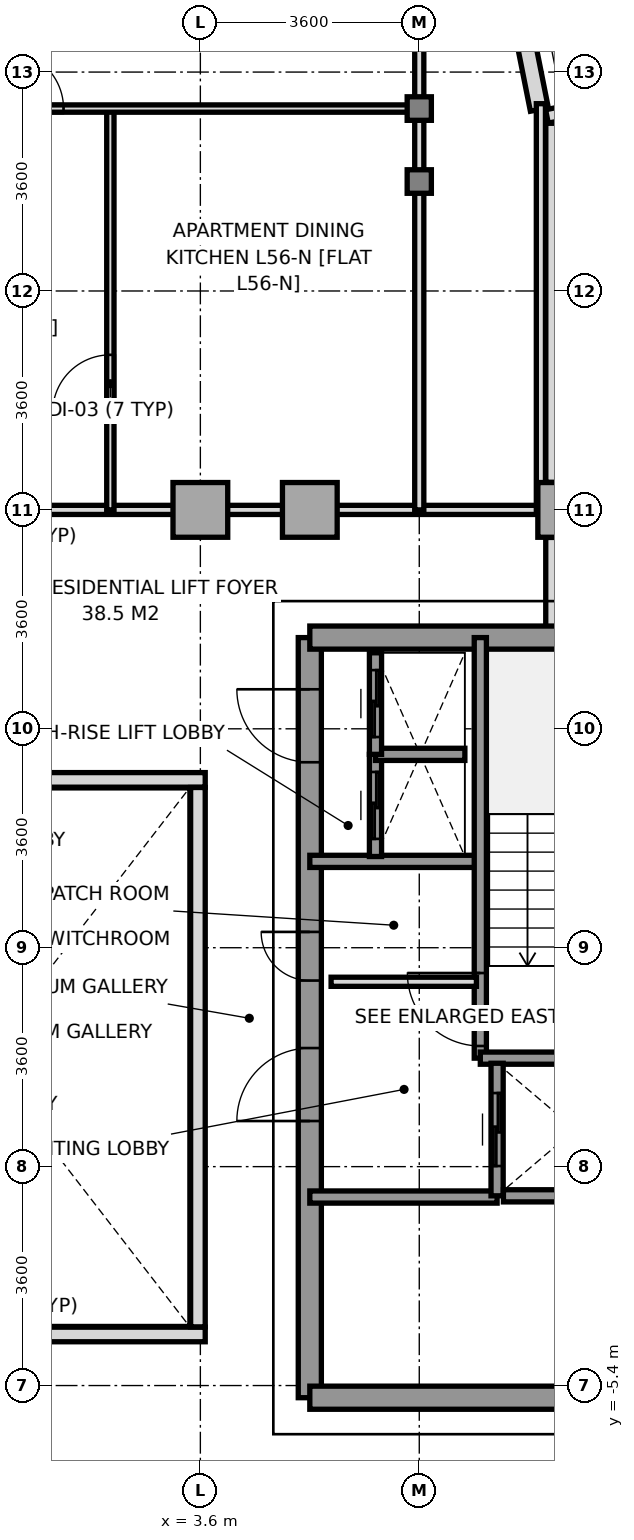
"""IFC4 building model, lengths in metres.
Left out: names, types, materials, properties, quantities, classifications, styles, units other than length and angle.
Written with IfcOpenShell. Run it as: python <this file> out.ifc"""

import sys

from ifc_helpers import new_model, si_unit, direction, frame, frame_2d, origin, origin_2d, place, context, subcontext, project, spatial, rectangle, i_section, extrude, source, transform, mapped, element, fill, save


model = new_model("IFC4")
c1 = context("Model", 3, precision=1e-05, world=origin(), true_north=direction((0.0, 1.0)))
c2 = subcontext(c1, "Body", "Model", "MODEL_VIEW")
j1 = project(units=[si_unit("LENGTHUNIT", "METRE"), si_unit("PLANEANGLEUNIT", "RADIAN")], contexts=[c1])
p1 = place(None, origin())
s1 = spatial("IfcSite", under=j1, at=p1, CompositionType="ELEMENT")
p2 = place(p1, origin())
s2 = spatial("IfcBuilding", under=s1, at=p2, CompositionType="ELEMENT")
p3 = place(p2, frame((0.0, 0.0, 204.6)))
s3 = spatial("IfcBuildingStorey", under=s2, at=p3, CompositionType="ELEMENT", Elevation=204.6)
m1 = source(origin(), c2, "Body", "SweptSolid", [
    extrude(rectangle(XDim=0.9, YDim=0.9, at=origin_2d()), origin(), (0.0, 0.0, 1.0), 3.2),
])
for number, where, z_axis, x_axis in (
    (1, (3.6, 9.0, 0.0), (0.0, 0.0, 1.0), (1.0, 0.0, 0.0)),
    (2, (5.4, 9.0, 0.0), (0.0, 0.0, 1.0), (1.0, 0.0, 0.0)),
):
    element("IfcColumn", number, at=place(p3, frame(where, z_axis=z_axis, x_axis=x_axis)), inside=s3, PredefinedType="COLUMN", context=c2, shape_type="MappedRepresentation", body=[
        mapped(m1, transform((0.0, 0.0, 0.0), x_axis=(1.0, 0.0, 0.0), y_axis=(0.0, 1.0, 0.0), z_axis=(0.0, 0.0, 1.0), scale=1.0)),
    ])
m2 = source(origin(), c2, "Body", "SweptSolid", [
    extrude(i_section(OverallWidth=0.398, OverallDepth=0.387, WebThickness=0.018, FlangeThickness=0.028, at=origin_2d()), origin(), (0.0, 0.0, 1.0), 3.2),
])
for number, where, z_axis, x_axis in (
    (3, (7.2, 14.4, 0.0), (0.0, 0.0, 1.0), (1.0, 0.0, 0.0)),
    (4, (7.2, 15.6, 0.0), (0.0, 0.0, 1.0), (1.0, 0.0, 0.0)),
):
    element("IfcColumn", number, at=place(p3, frame(where, z_axis=z_axis, x_axis=x_axis)), inside=s3, PredefinedType="COLUMN", context=c2, shape_type="MappedRepresentation", body=[
        mapped(m2, transform((0.0, 0.0, 0.0), x_axis=(1.0, 0.0, 0.0), y_axis=(0.0, 1.0, 0.0), z_axis=(0.0, 0.0, 1.0), scale=1.0)),
    ])
p4 = place(p3, frame((9.6, 9.0, 0.0), z_axis=(0.0, 0.0, 1.0), x_axis=(1.0, 0.0, 0.0)))
e5 = element("IfcColumn", 5, at=p4, inside=s3, PredefinedType="COLUMN", context=c2, shape_type="MappedRepresentation", body=[
    mapped(m1, transform((0.0, 0.0, 0.0), x_axis=(1.0, 0.0, 0.0), y_axis=(0.0, 1.0, 0.0), z_axis=(0.0, 0.0, 1.0), scale=1.0)),
])
p5 = place(p3, frame((9.175, 15.585, 0.0), z_axis=(0.0, 0.0, 1.0), x_axis=(-0.195114232679, 0.980780523974, 0.0)))
e6 = element("IfcWall", 6, at=p5, inside=s3, PredefinedType="SOLIDWALL", context=c2, shape_type="SweptSolid", body=[
    extrude(rectangle(XDim=3.609, YDim=0.3, at=frame_2d((1.804, 0.0))), origin(), (0.0, 0.0, 1.0), 3.2),
])
p6 = place(p3, frame((9.395, 15.604, 0.0), z_axis=(0.0, 0.0, 1.0), x_axis=(0.194652052864, -0.980872355771, 0.0)))
e7 = element("IfcWall", 7, at=p6, inside=s3, PredefinedType="PARAPET", context=c2, shape_type="SweptSolid", body=[
    extrude(rectangle(XDim=0.225, YDim=0.24, at=frame_2d((0.112, 0.0))), origin(), (0.0, 0.0, 1.0), 1.15),
])
p7 = place(p3, frame((9.4, 15.358, 0.0), z_axis=(0.0, 0.0, 1.0), x_axis=(0.0, -1.0, 0.0)))
e8 = element("IfcWall", 8, at=p7, inside=s3, PredefinedType="PARAPET", context=c2, shape_type="SweptSolid", body=[
    extrude(rectangle(XDim=5.905, YDim=0.24, at=frame_2d((2.952, 0.0))), origin(), (0.0, 0.0, 1.0), 1.15),
])
p8 = place(p3, frame((9.4, 8.547, 0.0), z_axis=(0.0, 0.0, 1.0), x_axis=(0.0, -1.0, 0.0)))
e9 = element("IfcWall", 9, at=p8, inside=s3, PredefinedType="PARAPET", context=c2, shape_type="SweptSolid", body=[
    extrude(rectangle(XDim=1.594, YDim=0.24, at=frame_2d((0.797, 0.0))), origin(), (0.0, 0.0, 1.0), 1.15),
])
p9 = place(p3, frame((5.4, -5.6, 0.0), z_axis=(0.0, 0.0, 1.0), x_axis=(0.0, 1.0, 0.0)))
e10 = element("IfcWall", 10, at=p9, inside=s3, PredefinedType="SHEAR", context=c2, shape_type="SweptSolid", body=[
    extrude(rectangle(XDim=12.5, YDim=0.38, at=frame_2d((6.25, 0.0))), origin(), (0.0, 0.0, 1.0), 3.2),
])
p10 = place(p9, frame((4.55, 0.0, 0.0)))
e11 = element("IfcOpeningElement", 11, at=p10, cuts=e10, PredefinedType="OPENING", context=c2, shape_type="SweptSolid", body=[
    extrude(rectangle(XDim=1.2, YDim=2.2, at=frame_2d((0.6, 1.1))), frame((0.0, 0.2, 0.0), z_axis=(0.0, -1.0, 0.0), x_axis=(1.0, 0.0, 0.0)), (0.0, 0.0, 1.0), 0.4),
])
p11 = place(p9, frame((10.45, 0.0, 0.0)))
e12 = element("IfcOpeningElement", 12, at=p11, cuts=e10, PredefinedType="OPENING", context=c2, shape_type="SweptSolid", body=[
    extrude(rectangle(XDim=1.2, YDim=2.2, at=frame_2d((0.6, 1.1))), frame((0.0, 0.2, 0.0), z_axis=(0.0, -1.0, 0.0), x_axis=(1.0, 0.0, 0.0)), (0.0, 0.0, 1.0), 0.4),
])
p12 = place(p9, frame((6.86, 0.0, 0.0)))
e13 = element("IfcOpeningElement", 13, at=p12, cuts=e10, PredefinedType="OPENING", context=c2, shape_type="SweptSolid", body=[
    extrude(rectangle(XDim=0.8, YDim=2.1, at=frame_2d((0.4, 1.05))), frame((0.0, 0.2, 0.0), z_axis=(0.0, -1.0, 0.0), x_axis=(1.0, 0.0, 0.0)), (0.0, 0.0, 1.0), 0.4),
])
p13 = place(p3, frame((5.4, 6.9, 0.0), z_axis=(0.0, 0.0, 1.0), x_axis=(1.0, 0.0, 0.0)))
e14 = element("IfcWall", 14, at=p13, inside=s3, PredefinedType="SHEAR", context=c2, shape_type="SweptSolid", body=[
    extrude(rectangle(XDim=5.956, YDim=0.38, at=frame_2d((2.978, 0.0))), origin(), (0.0, 0.0, 1.0), 3.2),
])
p14 = place(p3, frame((5.4, -5.6, 0.0), z_axis=(0.0, 0.0, 1.0), x_axis=(1.0, 0.0, 0.0)))
e15 = element("IfcWall", 15, at=p14, inside=s3, PredefinedType="SHEAR", context=c2, shape_type="SweptSolid", body=[
    extrude(rectangle(XDim=7.8, YDim=0.38, at=frame_2d((3.9, 0.0))), origin(), (0.0, 0.0, 1.0), 3.2),
])
p15 = place(p3, frame((5.4, 3.22, 0.0), z_axis=(0.0, 0.0, 1.0), x_axis=(1.0, 0.0, 0.0)))
e16 = element("IfcWall", 16, at=p15, inside=s3, PredefinedType="SOLIDWALL", context=c2, shape_type="SweptSolid", body=[
    extrude(rectangle(XDim=2.78, YDim=0.2, at=frame_2d((1.39, 0.0))), origin(), (0.0, 0.0, 1.0), 3.2),
])
p16 = place(p3, frame((5.4, -2.3, 0.0), z_axis=(0.0, 0.0, 1.0), x_axis=(1.0, 0.0, 0.0)))
e17 = element("IfcWall", 17, at=p16, inside=s3, PredefinedType="SOLIDWALL", context=c2, shape_type="SweptSolid", body=[
    extrude(rectangle(XDim=3.08, YDim=0.2, at=frame_2d((1.54, 0.0))), origin(), (0.0, 0.0, 1.0), 3.2),
])
p17 = place(p3, frame((8.204, -0.016, 0.0), z_axis=(0.0, 0.0, 1.0), x_axis=(0.0, 1.0, 0.0)))
e18 = element("IfcWall", 18, at=p17, inside=s3, PredefinedType="SOLIDWALL", context=c2, shape_type="SweptSolid", body=[
    extrude(rectangle(XDim=6.916, YDim=0.2, at=frame_2d((3.458, 0.0))), origin(), (0.0, 0.0, 1.0), 3.2),
])
p18 = place(p17, frame((0.2, 0.0, 0.0)))
e19 = element("IfcOpeningElement", 19, at=p18, cuts=e18, PredefinedType="OPENING", context=c2, shape_type="SweptSolid", body=[
    extrude(rectangle(XDim=1.2, YDim=2.2, at=frame_2d((0.6, 1.1))), frame((0.0, 0.11, 0.0), z_axis=(0.0, -1.0, 0.0), x_axis=(1.0, 0.0, 0.0)), (0.0, 0.0, 1.0), 0.22),
])
p19 = place(p3, frame((8.204, -0.016, 0.0), z_axis=(0.0, 0.0, 1.0), x_axis=(1.0, 0.0, 0.0)))
e20 = element("IfcWall", 20, at=p19, inside=s3, PredefinedType="SOLIDWALL", context=c2, shape_type="SweptSolid", body=[
    extrude(rectangle(XDim=3.152, YDim=0.2, at=frame_2d((1.576, 0.0))), origin(), (0.0, 0.0, 1.0), 3.2),
])
p20 = place(p3, frame((8.48, -2.28, 0.0), z_axis=(0.0, 0.0, 1.0), x_axis=(0.0, 1.0, 0.0)))
e21 = element("IfcWall", 21, at=p20, inside=s3, PredefinedType="SOLIDWALL", context=c2, shape_type="SweptSolid", body=[
    extrude(rectangle(XDim=2.18, YDim=0.2, at=frame_2d((1.09, 0.0))), origin(), (0.0, 0.0, 1.0), 3.2),
])
p21 = place(p20, frame((0.49, 0.0, 0.0)))
e22 = element("IfcOpeningElement", 22, at=p21, cuts=e21, PredefinedType="OPENING", context=c2, shape_type="SweptSolid", body=[
    extrude(rectangle(XDim=1.2, YDim=2.2, at=frame_2d((0.6, 1.1))), frame((0.0, 0.11, 0.0), z_axis=(0.0, -1.0, 0.0), x_axis=(1.0, 0.0, 0.0)), (0.0, 0.0, 1.0), 0.22),
])
p22 = place(p3, frame((8.584, -2.28, 0.0), z_axis=(0.0, 0.0, 1.0), x_axis=(1.0, 0.0, 0.0)))
e23 = element("IfcWall", 23, at=p22, inside=s3, PredefinedType="SOLIDWALL", context=c2, shape_type="SweptSolid", body=[
    extrude(rectangle(XDim=2.362, YDim=0.2, at=frame_2d((1.181, 0.0))), origin(), (0.0, 0.0, 1.0), 3.2),
])
p23 = place(p3, frame((6.48, 3.3, 0.0), z_axis=(0.0, 0.0, 1.0), x_axis=(0.0, 1.0, 0.0)))
e24 = element("IfcWall", 24, at=p23, inside=s3, PredefinedType="SOLIDWALL", context=c2, shape_type="SweptSolid", body=[
    extrude(rectangle(XDim=1.68, YDim=0.2, at=frame_2d((0.84, 0.0))), origin(), (0.0, 0.0, 1.0), 3.2),
])
p24 = place(p23, frame((0.29, 0.0, 0.0)))
e25 = element("IfcOpeningElement", 25, at=p24, cuts=e24, PredefinedType="OPENING", context=c2, shape_type="SweptSolid", body=[
    extrude(rectangle(XDim=1.1, YDim=2.2, at=frame_2d((0.55, 1.1))), frame((0.0, 0.11, 0.0), z_axis=(0.0, -1.0, 0.0), x_axis=(1.0, 0.0, 0.0)), (0.0, 0.0, 1.0), 0.22),
])
p25 = place(p3, frame((6.48, 4.98, 0.0), z_axis=(0.0, 0.0, 1.0), x_axis=(1.0, 0.0, 0.0)))
e26 = element("IfcWall", 26, at=p25, inside=s3, PredefinedType="SOLIDWALL", context=c2, shape_type="SweptSolid", body=[
    extrude(rectangle(XDim=1.47, YDim=0.2, at=frame_2d((0.735, 0.0))), origin(), (0.0, 0.0, 1.0), 3.2),
])
p26 = place(p3, frame((6.48, 4.98, 0.0), z_axis=(0.0, 0.0, 1.0), x_axis=(0.0, 1.0, 0.0)))
e27 = element("IfcWall", 27, at=p26, inside=s3, PredefinedType="SOLIDWALL", context=c2, shape_type="SweptSolid", body=[
    extrude(rectangle(XDim=1.67, YDim=0.2, at=frame_2d((0.835, 0.0))), origin(), (0.0, 0.0, 1.0), 3.2),
])
p27 = place(p26, frame((0.285, 0.0, 0.0)))
e28 = element("IfcOpeningElement", 28, at=p27, cuts=e27, PredefinedType="OPENING", context=c2, shape_type="SweptSolid", body=[
    extrude(rectangle(XDim=1.1, YDim=2.2, at=frame_2d((0.55, 1.1))), frame((0.0, 0.11, 0.0), z_axis=(0.0, -1.0, 0.0), x_axis=(1.0, 0.0, 0.0)), (0.0, 0.0, 1.0), 0.22),
])
p28 = place(p3, frame((5.75, 1.24, 0.0), z_axis=(0.0, 0.0, 1.0), x_axis=(1.0, 0.0, 0.0)))
e29 = element("IfcWall", 29, at=p28, inside=s3, PredefinedType="PARTITIONING", context=c2, shape_type="SweptSolid", body=[
    extrude(rectangle(XDim=2.39, YDim=0.15, at=frame_2d((1.195, 0.0))), origin(), (0.0, 0.0, 1.0), 2.3),
])
p29 = place(p3, frame((-9.55, 9.0, 0.0), z_axis=(0.0, 0.0, 1.0), x_axis=(1.0, 0.0, 0.0)))
e30 = element("IfcWall", 30, at=p29, inside=s3, PredefinedType="PARTITIONING", context=c2, shape_type="SweptSolid", body=[
    extrude(rectangle(XDim=19.1, YDim=0.15, at=frame_2d((9.55, 0.0))), origin(), (0.0, 0.0, 1.0), 2.75),
])
p30 = place(p29, frame((0.7, 0.0, 0.0)))
e31 = element("IfcOpeningElement", 31, at=p30, cuts=e30, PredefinedType="OPENING", context=c2, shape_type="SweptSolid", body=[
    extrude(rectangle(XDim=0.95, YDim=2.15, at=frame_2d((0.475, 1.075))), frame((0.0, 0.085, 0.0), z_axis=(0.0, -1.0, 0.0), x_axis=(1.0, 0.0, 0.0)), (0.0, 0.0, 1.0), 0.17),
])
p31 = place(p29, frame((9.05, 0.0, 0.0)))
e32 = element("IfcOpeningElement", 32, at=p31, cuts=e30, PredefinedType="OPENING", context=c2, shape_type="SweptSolid", body=[
    extrude(rectangle(XDim=1.0, YDim=2.2, at=frame_2d((0.5, 1.1))), frame((0.0, 0.085, 0.0), z_axis=(0.0, -1.0, 0.0), x_axis=(1.0, 0.0, 0.0)), (0.0, 0.0, 1.0), 0.17),
])
p32 = place(p3, frame((9.2, 9.0, 0.0), z_axis=(0.0, 0.0, 1.0), x_axis=(0.0, 1.0, 0.0)))
e33 = element("IfcWall", 33, at=p32, inside=s3, PredefinedType="PARTITIONING", context=c2, shape_type="SweptSolid", body=[
    extrude(rectangle(XDim=6.68, YDim=0.15, at=frame_2d((3.34, 0.0))), origin(), (0.0, 0.0, 1.0), 2.75),
])
p33 = place(p3, frame((7.2, 9.0, 0.0), z_axis=(0.0, 0.0, 1.0), x_axis=(0.0, 1.0, 0.0)))
e34 = element("IfcWall", 34, at=p33, inside=s3, PredefinedType="PARTITIONING", context=c2, shape_type="SweptSolid", body=[
    extrude(rectangle(XDim=12.02, YDim=0.15, at=frame_2d((6.01, 0.0))), origin(), (0.0, 0.0, 1.0), 2.75),
])
p34 = place(p3, frame((2.12, 9.0, 0.0), z_axis=(0.0, 0.0, 1.0), x_axis=(0.0, 1.0, 0.0)))
e35 = element("IfcWall", 35, at=p34, inside=s3, PredefinedType="PARTITIONING", context=c2, shape_type="SweptSolid", body=[
    extrude(rectangle(XDim=6.6, YDim=0.12, at=frame_2d((3.3, 0.0))), origin(), (0.0, 0.0, 1.0), 2.75),
])
p35 = place(p34, frame((1.6, 0.0, 0.0)))
e36 = element("IfcOpeningElement", 36, at=p35, cuts=e35, PredefinedType="OPENING", context=c2, shape_type="SweptSolid", body=[
    extrude(rectangle(XDim=0.95, YDim=2.15, at=frame_2d((0.475, 1.075))), frame((0.0, 0.07, 0.0), z_axis=(0.0, -1.0, 0.0), x_axis=(1.0, 0.0, 0.0)), (0.0, 0.0, 1.0), 0.14),
])
p36 = place(p3, frame((-7.2, 15.6, 0.0), z_axis=(0.0, 0.0, 1.0), x_axis=(1.0, 0.0, 0.0)))
e37 = element("IfcWall", 37, at=p36, inside=s3, PredefinedType="PARTITIONING", context=c2, shape_type="SweptSolid", body=[
    extrude(rectangle(XDim=14.4, YDim=0.12, at=frame_2d((7.2, 0.0))), origin(), (0.0, 0.0, 1.0), 2.75),
])
p37 = place(p36, frame((5.5, 0.0, 0.0)))
e38 = element("IfcOpeningElement", 38, at=p37, cuts=e37, PredefinedType="OPENING", context=c2, shape_type="SweptSolid", body=[
    extrude(rectangle(XDim=1.1, YDim=2.2, at=frame_2d((0.55, 1.1))), frame((0.0, 0.07, 0.0), z_axis=(0.0, -1.0, 0.0), x_axis=(1.0, 0.0, 0.0)), (0.0, 0.0, 1.0), 0.14),
])
p38 = place(p36, frame((7.6, 0.0, 0.0)))
e39 = element("IfcOpeningElement", 39, at=p38, cuts=e37, PredefinedType="OPENING", context=c2, shape_type="SweptSolid", body=[
    extrude(rectangle(XDim=0.95, YDim=2.15, at=frame_2d((0.475, 1.075))), frame((0.0, 0.07, 0.0), z_axis=(0.0, -1.0, 0.0), x_axis=(1.0, 0.0, 0.0)), (0.0, 0.0, 1.0), 0.14),
])
for number, where, z_axis, x_axis in (
    (40, (-3.68, -4.56, 0.0), (0.0, 0.0, 1.0), (1.0, 0.0, 0.0)),
    (41, (-3.68, 4.56, 0.0), (0.0, 0.0, 1.0), (1.0, 0.0, 0.0)),
):
    element("IfcWall", number, at=place(p3, frame(where, z_axis=z_axis, x_axis=x_axis)), inside=s3, PredefinedType="PARAPET", context=c2, shape_type="SweptSolid", body=[
        extrude(rectangle(XDim=7.36, YDim=0.24, at=frame_2d((3.68, 0.0))), origin(), (0.0, 0.0, 1.0), 1.15),
    ])
p39 = place(p3, frame((3.56, -4.435, 0.0), z_axis=(0.0, 0.0, 1.0), x_axis=(0.0, 1.0, 0.0)))
e42 = element("IfcWall", 42, at=p39, inside=s3, PredefinedType="PARAPET", context=c2, shape_type="SweptSolid", body=[
    extrude(rectangle(XDim=8.87, YDim=0.24, at=frame_2d((4.435, 0.0))), origin(), (0.0, 0.0, 1.0), 1.15),
])
m3 = source(origin(), c2, "Body", "SweptSolid", [
    extrude(rectangle(XDim=1.2, YDim=2.2, at=frame_2d((0.6, 1.1))), frame((0.0, 0.025, 0.0), z_axis=(0.0, -1.0, 0.0), x_axis=(1.0, 0.0, 0.0)), (0.0, 0.0, 1.0), 0.05),
])
p40 = place(p18, origin())
e43 = element("IfcDoor", 43, at=p40, inside=s3, OperationType="SINGLE_SWING_RIGHT", PredefinedType="DOOR", context=c2, shape_type="MappedRepresentation", body=[
    mapped(m3, transform((0.0, 0.0, 0.0), x_axis=(1.0, 0.0, 0.0), y_axis=(0.0, 1.0, 0.0), z_axis=(0.0, 0.0, 1.0), scale=1.0)),
])
fill(e19, e43)
p41 = place(p10, origin())
e44 = element("IfcDoor", 44, at=p41, inside=s3, OperationType="SINGLE_SWING_LEFT", PredefinedType="DOOR", context=c2, shape_type="MappedRepresentation", body=[
    mapped(m3, transform((0.0, 0.0, 0.0), x_axis=(1.0, 0.0, 0.0), y_axis=(0.0, 1.0, 0.0), z_axis=(0.0, 0.0, 1.0), scale=1.0)),
])
fill(e11, e44)
p42 = place(p11, origin())
e45 = element("IfcDoor", 45, at=p42, inside=s3, OperationType="SINGLE_SWING_RIGHT", PredefinedType="DOOR", context=c2, shape_type="MappedRepresentation", body=[
    mapped(m3, transform((0.0, 0.0, 0.0), x_axis=(1.0, 0.0, 0.0), y_axis=(0.0, 1.0, 0.0), z_axis=(0.0, 0.0, 1.0), scale=1.0)),
])
fill(e12, e45)
m4 = source(origin(), c2, "Body", "SweptSolid", [
    extrude(rectangle(XDim=0.8, YDim=2.1, at=frame_2d((0.4, 1.05))), frame((0.0, 0.025, 0.0), z_axis=(0.0, -1.0, 0.0), x_axis=(1.0, 0.0, 0.0)), (0.0, 0.0, 1.0), 0.05),
])
p43 = place(p12, origin())
e46 = element("IfcDoor", 46, at=p43, inside=s3, OperationType="SINGLE_SWING_RIGHT", PredefinedType="DOOR", context=c2, shape_type="MappedRepresentation", body=[
    mapped(m4, transform((0.0, 0.0, 0.0), x_axis=(1.0, 0.0, 0.0), y_axis=(0.0, 1.0, 0.0), z_axis=(0.0, 0.0, 1.0), scale=1.0)),
])
fill(e13, e46)
p44 = place(p21, origin())
e47 = element("IfcDoor", 47, at=p44, inside=s3, OperationType="SLIDING_TO_RIGHT", PredefinedType="DOOR", context=c2, shape_type="MappedRepresentation", body=[
    mapped(m3, transform((0.0, 0.0, 0.0), x_axis=(1.0, 0.0, 0.0), y_axis=(0.0, 1.0, 0.0), z_axis=(0.0, 0.0, 1.0), scale=1.0)),
])
fill(e22, e47)
m5 = source(origin(), c2, "Body", "SweptSolid", [
    extrude(rectangle(XDim=1.1, YDim=2.2, at=frame_2d((0.55, 1.1))), frame((0.0, 0.025, 0.0), z_axis=(0.0, -1.0, 0.0), x_axis=(1.0, 0.0, 0.0)), (0.0, 0.0, 1.0), 0.05),
])
p45 = place(p24, origin())
e48 = element("IfcDoor", 48, at=p45, inside=s3, OperationType="SLIDING_TO_LEFT", PredefinedType="DOOR", context=c2, shape_type="MappedRepresentation", body=[
    mapped(m5, transform((0.0, 0.0, 0.0), x_axis=(1.0, 0.0, 0.0), y_axis=(0.0, 1.0, 0.0), z_axis=(0.0, 0.0, 1.0), scale=1.0)),
])
fill(e25, e48)
p46 = place(p27, origin())
e49 = element("IfcDoor", 49, at=p46, inside=s3, OperationType="SLIDING_TO_LEFT", PredefinedType="DOOR", context=c2, shape_type="MappedRepresentation", body=[
    mapped(m5, transform((0.0, 0.0, 0.0), x_axis=(1.0, 0.0, 0.0), y_axis=(0.0, 1.0, 0.0), z_axis=(0.0, 0.0, 1.0), scale=1.0)),
])
fill(e28, e49)
m6 = source(origin(), c2, "Body", "SweptSolid", [
    extrude(rectangle(XDim=0.95, YDim=2.15, at=frame_2d((0.475, 1.075))), frame((0.0, 0.025, 0.0), z_axis=(0.0, -1.0, 0.0), x_axis=(1.0, 0.0, 0.0)), (0.0, 0.0, 1.0), 0.05),
])
p47 = place(p35, origin())
e50 = element("IfcDoor", 50, at=p47, inside=s3, OperationType="SINGLE_SWING_LEFT", PredefinedType="DOOR", context=c2, shape_type="MappedRepresentation", body=[
    mapped(m6, transform((0.0, 0.0, 0.0), x_axis=(1.0, 0.0, 0.0), y_axis=(0.0, 1.0, 0.0), z_axis=(0.0, 0.0, 1.0), scale=1.0)),
])
fill(e36, e50)
p48 = place(p38, origin())
e51 = element("IfcDoor", 51, at=p48, inside=s3, OperationType="SINGLE_SWING_LEFT", PredefinedType="DOOR", context=c2, shape_type="MappedRepresentation", body=[
    mapped(m6, transform((0.0, 0.0, 0.0), x_axis=(1.0, 0.0, 0.0), y_axis=(0.0, 1.0, 0.0), z_axis=(0.0, 0.0, 1.0), scale=1.0)),
])
fill(e39, e51)
save(model, sys.argv[1])
